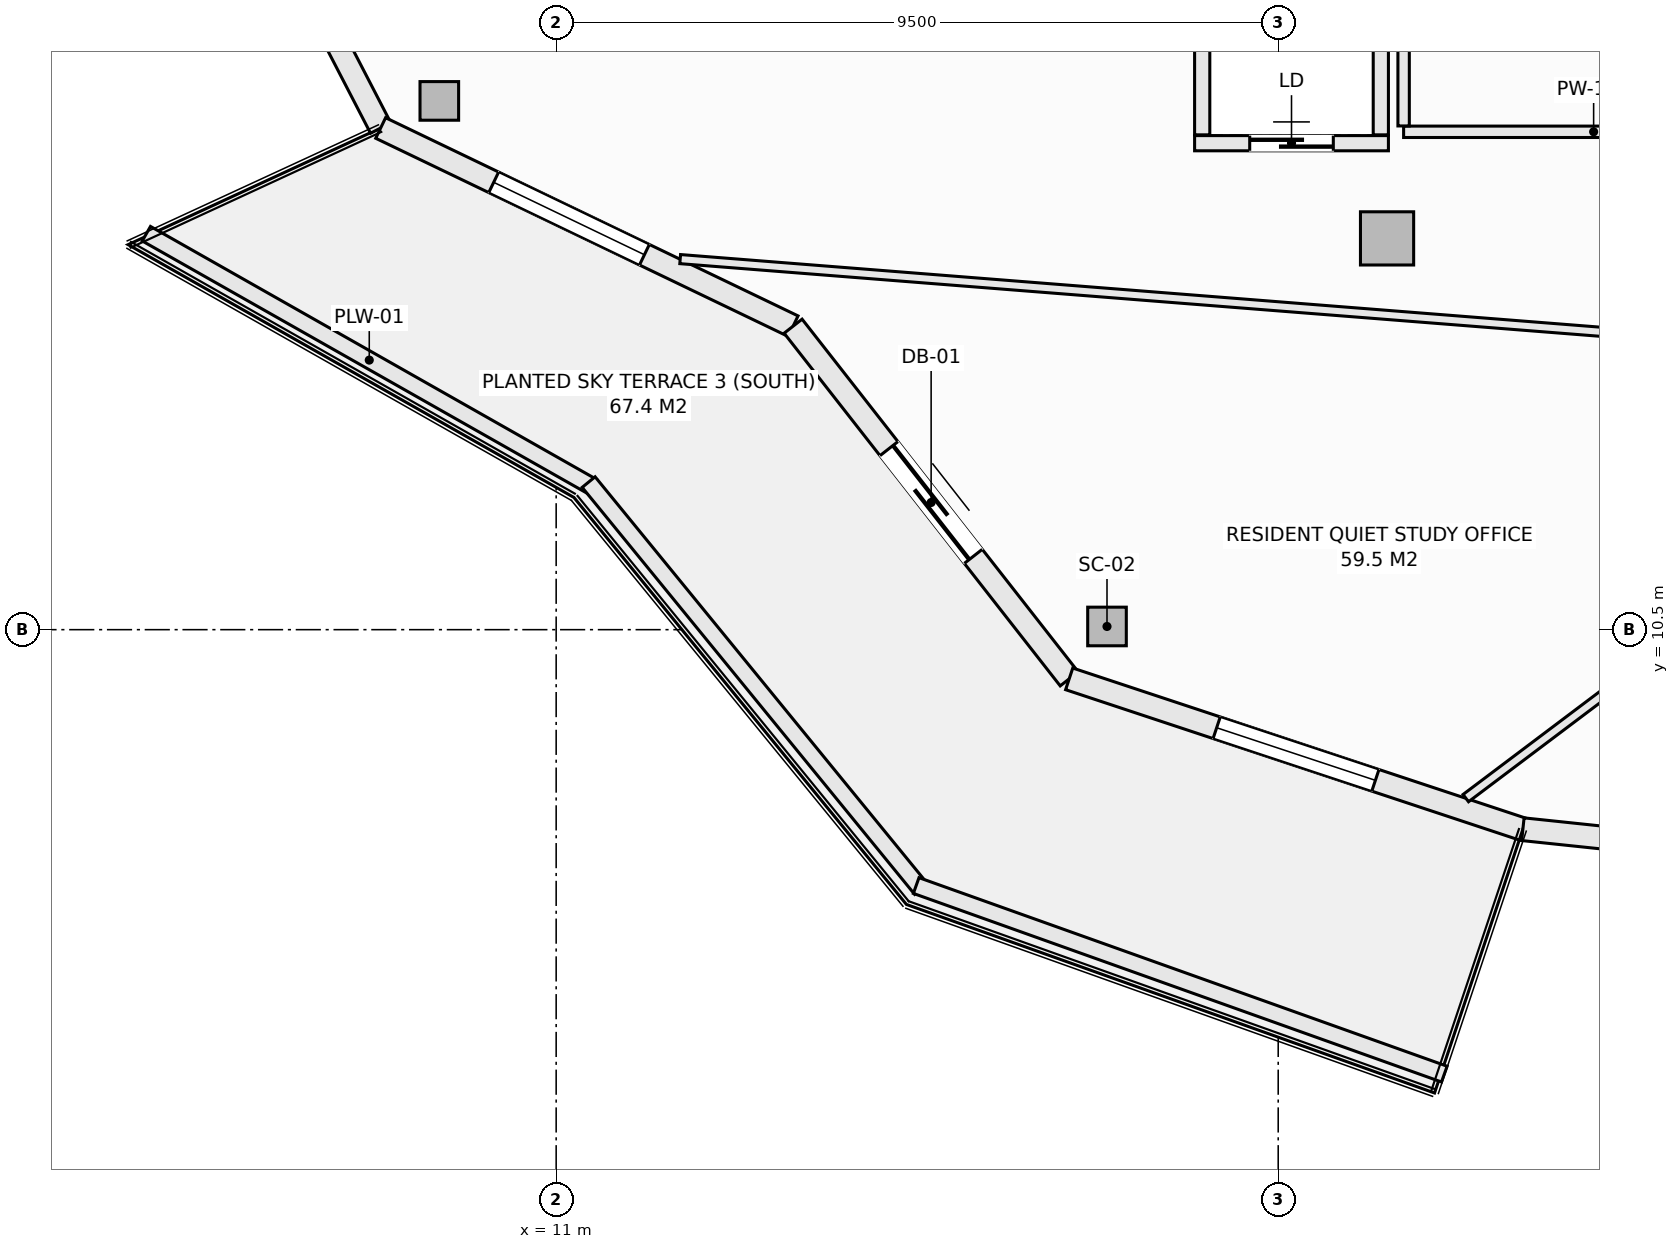
"""IFC4 building model, lengths in metres.
Left out: names, types, materials, properties, quantities, classifications, styles, units other than length and angle.
Written with IfcOpenShell. Run it as: python <this file> out.ifc"""

import sys

from ifc_helpers import new_model, si_unit, direction, frame, frame_2d, origin, origin_2d, place, context, subcontext, project, spatial, rectangle, hollow_rectangle, extrude, element, fill, save


model = new_model("IFC4")
c1 = context("Model", 3, precision=1e-05, world=origin(), true_north=direction((0.0, 1.0)))
c2 = subcontext(c1, "Body", "Model", "MODEL_VIEW")
j1 = project(units=[si_unit("LENGTHUNIT", "METRE"), si_unit("PLANEANGLEUNIT", "RADIAN")], contexts=[c1])
p1 = place(None, origin())
s1 = spatial("IfcSite", under=j1, at=p1, CompositionType="ELEMENT")
p2 = place(p1, origin())
s2 = spatial("IfcBuilding", under=s1, at=p2, CompositionType="ELEMENT")
p3 = place(p2, frame((0.0, 0.0, 196.4)))
s3 = spatial("IfcBuildingStorey", under=s2, at=p3, CompositionType="ELEMENT", Elevation=196.4)
for number, where, z_axis, x_axis in (
    (1, (9.463, 17.456, -0.27), (0.0, 0.0, 1.0), (1.0, 0.0, 0.0)),
    (2, (18.247, 10.542, -0.27), (0.0, 0.0, 1.0), (1.0, 0.0, 0.0)),
):
    element("IfcColumn", number, at=place(p3, frame(where, z_axis=z_axis, x_axis=x_axis)), inside=s3, PredefinedType="COLUMN", context=c2, shape_type="SweptSolid", body=[
        extrude(hollow_rectangle(XDim=0.508, YDim=0.508, WallThickness=0.019, at=origin_2d()), origin(), (0.0, 0.0, 1.0), 3.3),
    ])
p4 = place(p3, frame((21.932, 15.648, -0.27), z_axis=(0.0, 0.0, 1.0), x_axis=(1.0, 0.0, 0.0)))
e3 = element("IfcColumn", 3, at=p4, inside=s3, PredefinedType="COLUMN", context=c2, shape_type="SweptSolid", body=[
    extrude(rectangle(XDim=0.7, YDim=0.7, at=origin_2d()), origin(), (0.0, 0.0, 1.0), 3.3),
])
p5 = place(p3, frame((6.218, 21.875, 0.0), z_axis=(0.0, 0.0, 1.0), x_axis=(0.459808219482, -0.888018243786, 0.0)))
e4 = element("IfcWall", 4, at=p5, inside=s3, PredefinedType="SOLIDWALL", context=c2, shape_type="SweptSolid", body=[
    extrude(rectangle(XDim=5.378, YDim=0.3, at=frame_2d((2.689, 0.0))), origin(), (0.0, 0.0, 1.0), 2.605),
])
p6 = place(p5, frame((1.589, 0.0, 0.72)))
e5 = element("IfcOpeningElement", 5, at=p6, cuts=e4, PredefinedType="OPENING", context=c2, shape_type="SweptSolid", body=[
    extrude(rectangle(XDim=2.2, YDim=1.65, at=frame_2d((1.1, 0.825))), frame((0.0, 0.16, 0.0), z_axis=(0.0, -1.0, 0.0), x_axis=(1.0, 0.0, 0.0)), (0.0, 0.0, 1.0), 0.32),
])
p7 = place(p3, frame((8.691, 17.1, 0.0), z_axis=(0.0, 0.0, 1.0), x_axis=(0.901348331142, -0.433094892545, 0.0)))
e6 = element("IfcWall", 6, at=p7, inside=s3, PredefinedType="SOLIDWALL", context=c2, shape_type="SweptSolid", body=[
    extrude(rectangle(XDim=6.021, YDim=0.3, at=frame_2d((3.01, 0.0))), origin(), (0.0, 0.0, 1.0), 2.605),
])
p8 = place(p7, frame((1.65, 0.0, 0.72)))
e7 = element("IfcOpeningElement", 7, at=p8, cuts=e6, PredefinedType="OPENING", context=c2, shape_type="SweptSolid", body=[
    extrude(rectangle(XDim=2.2, YDim=1.65, at=frame_2d((1.1, 0.825))), frame((0.0, 0.16, 0.0), z_axis=(0.0, -1.0, 0.0), x_axis=(1.0, 0.0, 0.0)), (0.0, 0.0, 1.0), 0.32),
])
p9 = place(p3, frame((14.117, 14.493, 0.0), z_axis=(0.0, 0.0, 1.0), x_axis=(0.616450126935, -0.787393955401, 0.0)))
e8 = element("IfcWall", 8, at=p9, inside=s3, PredefinedType="SOLIDWALL", context=c2, shape_type="SweptSolid", body=[
    extrude(rectangle(XDim=5.893, YDim=0.3, at=frame_2d((2.946, 0.0))), origin(), (0.0, 0.0, 1.0), 2.605),
])
p10 = place(p9, frame((2.046, 0.0, 0.0)))
e9 = element("IfcOpeningElement", 9, at=p10, cuts=e8, PredefinedType="OPENING", context=c2, shape_type="SweptSolid", body=[
    extrude(rectangle(XDim=1.8, YDim=2.25, at=frame_2d((0.9, 1.125))), frame((0.0, 0.16, 0.0), z_axis=(0.0, -1.0, 0.0), x_axis=(1.0, 0.0, 0.0)), (0.0, 0.0, 1.0), 0.32),
])
p11 = place(p3, frame((17.75, 9.853, 0.0), z_axis=(0.0, 0.0, 1.0), x_axis=(0.949240877604, -0.314550085495, 0.0)))
e10 = element("IfcWall", 10, at=p11, inside=s3, PredefinedType="SOLIDWALL", context=c2, shape_type="SweptSolid", body=[
    extrude(rectangle(XDim=6.288, YDim=0.3, at=frame_2d((3.144, 0.0))), origin(), (0.0, 0.0, 1.0), 2.605),
])
p12 = place(p11, frame((2.044, 0.0, 0.72)))
e11 = element("IfcOpeningElement", 11, at=p12, cuts=e10, PredefinedType="OPENING", context=c2, shape_type="SweptSolid", body=[
    extrude(rectangle(XDim=2.2, YDim=1.65, at=frame_2d((1.1, 0.825))), frame((0.0, 0.16, 0.0), z_axis=(0.0, -1.0, 0.0), x_axis=(1.0, 0.0, 0.0)), (0.0, 0.0, 1.0), 0.32),
])
p13 = place(p3, frame((23.719, 7.875, 0.0), z_axis=(0.0, 0.0, 1.0), x_axis=(0.994497142298, -0.104763705363, 0.0)))
e12 = element("IfcWall", 12, at=p13, inside=s3, PredefinedType="SOLIDWALL", context=c2, shape_type="SweptSolid", body=[
    extrude(rectangle(XDim=6.441, YDim=0.3, at=frame_2d((3.221, 0.0))), origin(), (0.0, 0.0, 1.0), 2.605),
])
p14 = place(p13, frame((2.121, 0.0, 0.72)))
e13 = element("IfcOpeningElement", 13, at=p14, cuts=e12, PredefinedType="OPENING", context=c2, shape_type="SweptSolid", body=[
    extrude(rectangle(XDim=2.2, YDim=1.65, at=frame_2d((1.1, 0.825))), frame((0.0, 0.16, 0.0), z_axis=(0.0, -1.0, 0.0), x_axis=(1.0, 0.0, 0.0)), (0.0, 0.0, 1.0), 0.32),
])
p15 = place(p3, frame((5.608, 15.709, 0.0), z_axis=(0.0, 0.0, 1.0), x_axis=(0.869860619267, -0.493297580623, 0.0)))
e14 = element("IfcWall", 14, at=p15, inside=s3, PredefinedType="PARAPET", context=c2, shape_type="SweptSolid", body=[
    extrude(rectangle(XDim=6.743, YDim=0.22, at=frame_2d((3.371, 0.0))), origin(), (0.0, 0.0, 1.0), 0.52),
])
p16 = place(p3, frame((11.427, 12.441, 0.0), z_axis=(0.0, 0.0, 1.0), x_axis=(0.632697312147, -0.774399193699, 0.0)))
e15 = element("IfcWall", 15, at=p16, inside=s3, PredefinedType="PARAPET", context=c2, shape_type="SweptSolid", body=[
    extrude(rectangle(XDim=6.914, YDim=0.22, at=frame_2d((3.457, 0.0))), origin(), (0.0, 0.0, 1.0), 0.52),
])
p17 = place(p3, frame((15.737, 7.134, 0.0), z_axis=(0.0, 0.0, 1.0), x_axis=(0.941780086523, -0.336229488042, 0.0)))
e16 = element("IfcWall", 16, at=p17, inside=s3, PredefinedType="PARAPET", context=c2, shape_type="SweptSolid", body=[
    extrude(rectangle(XDim=7.378, YDim=0.22, at=frame_2d((3.689, 0.0))), origin(), (0.0, 0.0, 1.0), 0.52),
])
p18 = place(p3, frame((19.4, 16.9, 0.0), z_axis=(0.0, 0.0, 1.0), x_axis=(1.0, 0.0, 0.0)))
e17 = element("IfcWall", 17, at=p18, inside=s3, PredefinedType="SOLIDWALL", context=c2, shape_type="SweptSolid", body=[
    extrude(rectangle(XDim=2.55, YDim=0.2, at=frame_2d((1.275, 0.0))), origin(), (0.0, 0.0, 1.0), 3.03),
])
p19 = place(p18, frame((0.725, 0.0, 0.0)))
e18 = element("IfcOpeningElement", 18, at=p19, cuts=e17, PredefinedType="OPENING", context=c2, shape_type="SweptSolid", body=[
    extrude(rectangle(XDim=1.1, YDim=2.2, at=frame_2d((0.55, 1.1))), frame((0.0, 0.11, 0.0), z_axis=(0.0, -1.0, 0.0), x_axis=(1.0, 0.0, 0.0)), (0.0, 0.0, 1.0), 0.22),
])
for number, where, z_axis, x_axis in (
    (19, (19.5, 17.01, 0.0), (0.0, 0.0, 1.0), (0.0, 1.0, 0.0)),
    (20, (21.85, 17.01, 0.0), (0.0, 0.0, 1.0), (0.0, 1.0, 0.0)),
):
    element("IfcWall", number, at=place(p3, frame(where, z_axis=z_axis, x_axis=x_axis)), inside=s3, PredefinedType="SOLIDWALL", context=c2, shape_type="SweptSolid", body=[
        extrude(rectangle(XDim=2.53, YDim=0.2, at=frame_2d((1.265, 0.0))), origin(), (0.0, 0.0, 1.0), 3.03),
    ])
p20 = place(p3, frame((22.15, 17.05, 0.0), z_axis=(0.0, 0.0, 1.0), x_axis=(1.0, 0.0, 0.0)))
e21 = element("IfcWall", 21, at=p20, inside=s3, PredefinedType="PARTITIONING", context=c2, shape_type="SweptSolid", body=[
    extrude(rectangle(XDim=5.0, YDim=0.15, at=frame_2d((2.5, 0.0))), origin(), (0.0, 0.0, 1.0), 3.03),
])
p21 = place(p3, frame((22.15, 17.127, 0.0), z_axis=(0.0, 0.0, 1.0), x_axis=(0.0, 1.0, 0.0)))
e22 = element("IfcWall", 22, at=p21, inside=s3, PredefinedType="PARTITIONING", context=c2, shape_type="SweptSolid", body=[
    extrude(rectangle(XDim=2.823, YDim=0.15, at=frame_2d((1.412, 0.0))), origin(), (0.0, 0.0, 1.0), 3.03),
])
p22 = place(p3, frame((12.632, 15.375, 0.0), z_axis=(0.0, 0.0, 1.0), x_axis=(0.996898009465, -0.078704248448, 0.0)))
e23 = element("IfcWall", 23, at=p22, inside=s3, PredefinedType="PARTITIONING", context=c2, shape_type="SweptSolid", body=[
    extrude(rectangle(XDim=14.486, YDim=0.12, at=frame_2d((7.243, 0.0))), origin(), (0.0, 0.0, 1.0), 2.712),
])
p23 = place(p3, frame((22.968, 8.284, 0.0), z_axis=(0.0, 0.0, 1.0), x_axis=(0.798824033637, 0.601564762336, 0.0)))
e24 = element("IfcWall", 24, at=p23, inside=s3, PredefinedType="PARTITIONING", context=c2, shape_type="SweptSolid", body=[
    extrude(rectangle(XDim=5.139, YDim=0.12, at=frame_2d((2.569, 0.0))), origin(), (0.0, 0.0, 1.0), 2.712),
])
p24 = place(p8, origin())
e25 = element("IfcWindow", 25, at=p24, inside=s3, PartitioningType="SINGLE_PANEL", PredefinedType="WINDOW", context=c2, shape_type="SweptSolid", body=[
    extrude(rectangle(XDim=2.2, YDim=1.65, at=frame_2d((1.1, 0.825))), frame((0.0, 0.03, 0.0), z_axis=(0.0, -1.0, 0.0), x_axis=(1.0, 0.0, 0.0)), (0.0, 0.0, 1.0), 0.06),
])
fill(e7, e25)
p25 = place(p10, frame((1.8, 0.0, 0.0), z_axis=(0.0, 0.0, 1.0), x_axis=(-1.0, 0.0, 0.0)))
e26 = element("IfcDoor", 26, at=p25, inside=s3, OperationType="SLIDING_TO_LEFT", PredefinedType="DOOR", context=c2, shape_type="SweptSolid", body=[
    extrude(rectangle(XDim=1.8, YDim=2.25, at=frame_2d((0.9, 1.125))), frame((0.0, 0.025, 0.0), z_axis=(0.0, -1.0, 0.0), x_axis=(1.0, 0.0, 0.0)), (0.0, 0.0, 1.0), 0.05),
])
fill(e9, e26)
p26 = place(p12, origin())
e27 = element("IfcWindow", 27, at=p26, inside=s3, PartitioningType="SINGLE_PANEL", PredefinedType="WINDOW", context=c2, shape_type="SweptSolid", body=[
    extrude(rectangle(XDim=2.2, YDim=1.65, at=frame_2d((1.1, 0.825))), frame((0.0, 0.03, 0.0), z_axis=(0.0, -1.0, 0.0), x_axis=(1.0, 0.0, 0.0)), (0.0, 0.0, 1.0), 0.06),
])
fill(e11, e27)
p27 = place(p19, origin())
e28 = element("IfcDoor", 28, at=p27, inside=s3, OperationType="SLIDING_TO_LEFT", PredefinedType="DOOR", context=c2, shape_type="SweptSolid", body=[
    extrude(rectangle(XDim=1.1, YDim=2.2, at=frame_2d((0.55, 1.1))), frame((0.0, 0.025, 0.0), z_axis=(0.0, -1.0, 0.0), x_axis=(1.0, 0.0, 0.0)), (0.0, 0.0, 1.0), 0.05),
])
fill(e18, e28)
save(model, sys.argv[1])
